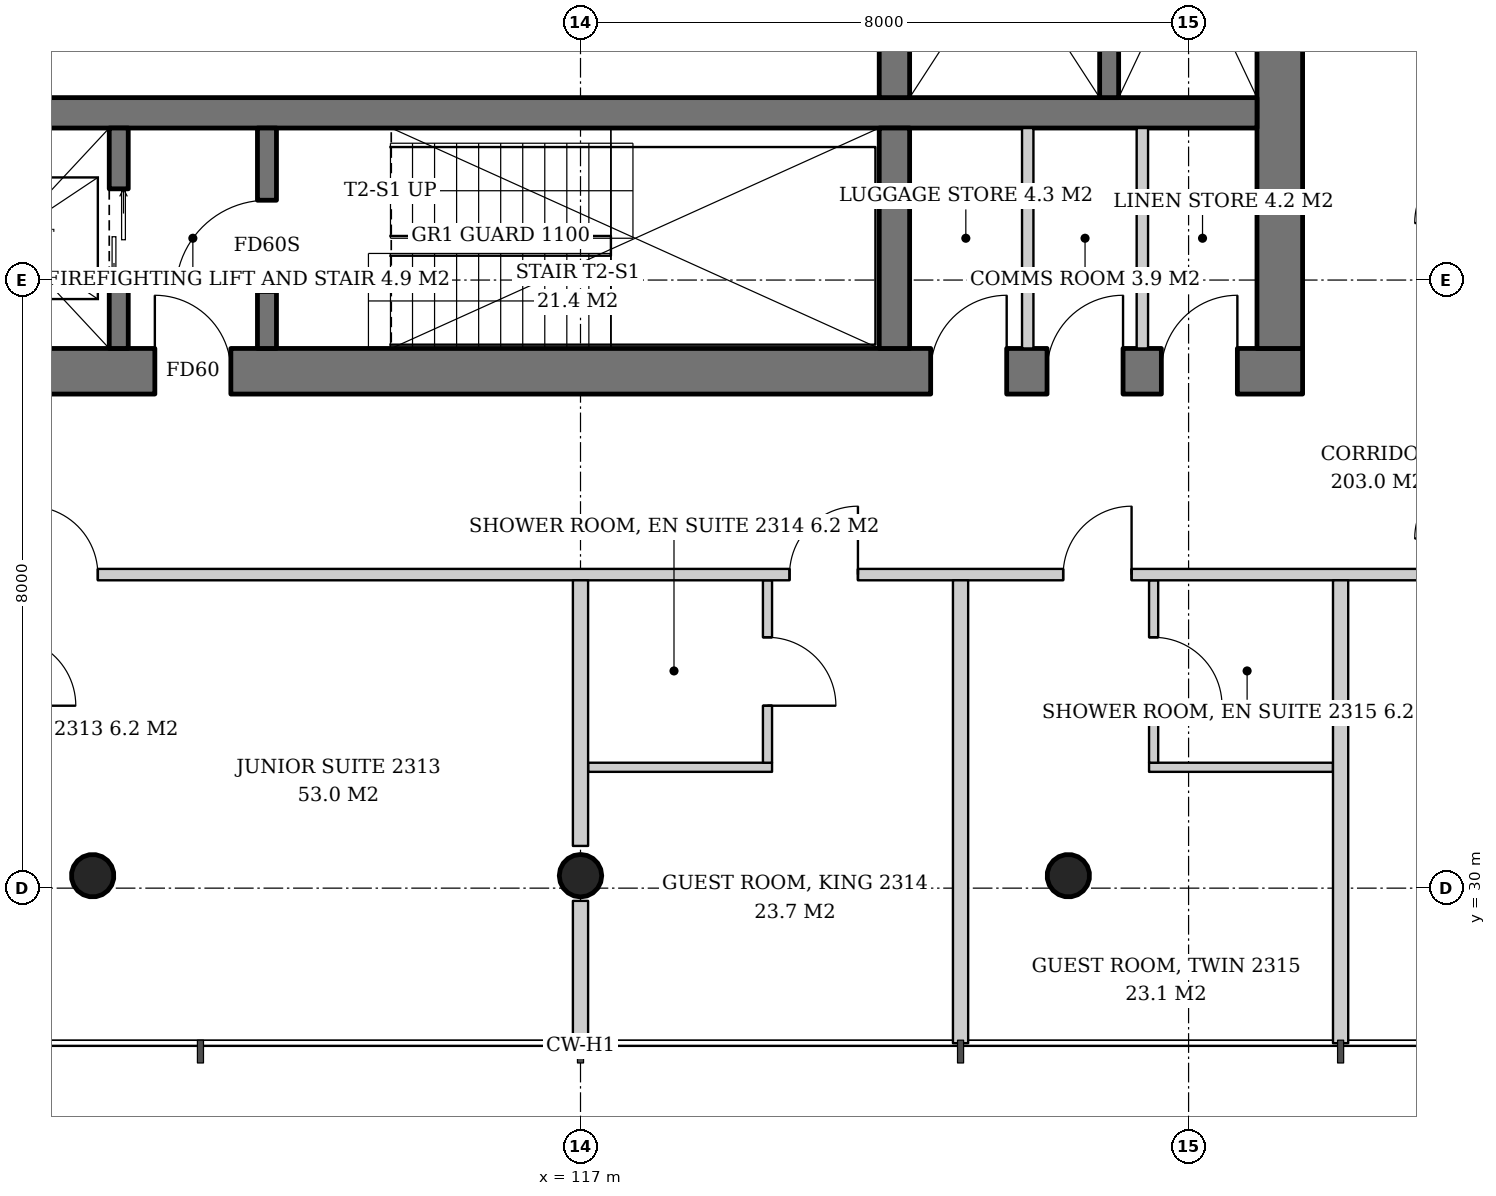
"""IFC4 building model, lengths in metres.
Left out: names, types, materials, properties, quantities, classifications, styles, units other than length and angle.
Written with IfcOpenShell. Run it as: python <this file> out.ifc"""

import sys

from ifc_helpers import new_model, si_unit, direction, frame, frame_2d, origin, origin_2d, place, context, subcontext, project, spatial, rectangle, hollow_circle, extrude, element, fill, save


model = new_model("IFC4")
c1 = context("Model", 3, precision=1e-05, world=origin(), true_north=direction((0.0, 1.0)))
c2 = subcontext(c1, "Body", "Model", "MODEL_VIEW")
j1 = project(units=[si_unit("LENGTHUNIT", "METRE"), si_unit("PLANEANGLEUNIT", "RADIAN")], contexts=[c1])
p1 = place(None, origin())
s1 = spatial("IfcSite", under=j1, at=p1, CompositionType="ELEMENT")
p2 = place(p1, origin())
s2 = spatial("IfcBuilding", under=s1, at=p2, CompositionType="ELEMENT")
p3 = place(p2, frame((0.0, 0.0, 93.2)))
s3 = spatial("IfcBuildingStorey", under=s2, at=p3, CompositionType="ELEMENT", Elevation=93.2)
p4 = place(p3, frame((110.556, 30.112, 0.0), z_axis=(0.021497706284, 0.043059584825, 0.998841188968), x_axis=(-0.894693706707, 0.446680166538, 0.0)))
e1 = element("IfcColumn", 1, at=p4, inside=s3, PredefinedType="COLUMN", context=c2, shape_type="SweptSolid", body=[
    extrude(hollow_circle(Radius=0.28, WallThickness=0.02, at=origin_2d()), origin(), (0.0, 0.0, 1.0), 3.804),
])
p5 = place(p3, frame((117.0, 30.112, 0.0), z_axis=(0.0, 0.043069538298, 0.999072076915), x_axis=(-1.0, 0.0, 0.0)))
e2 = element("IfcColumn", 2, at=p5, inside=s3, PredefinedType="COLUMN", context=c2, shape_type="SweptSolid", body=[
    extrude(hollow_circle(Radius=0.28, WallThickness=0.02, at=origin_2d()), origin(), (0.0, 0.0, 1.0), 3.803),
])
p6 = place(p3, frame((123.444, 30.112, 0.0), z_axis=(-0.021497706284, 0.043059584825, 0.998841188968), x_axis=(-0.894693706707, -0.446680166538, 0.0)))
e3 = element("IfcColumn", 3, at=p6, inside=s3, PredefinedType="COLUMN", context=c2, shape_type="SweptSolid", body=[
    extrude(hollow_circle(Radius=0.28, WallThickness=0.02, at=origin_2d()), origin(), (0.0, 0.0, 1.0), 3.804),
])
p7 = place(p3, frame((107.5, 36.8, 0.0), z_axis=(0.0, 0.0, 1.0), x_axis=(1.0, 0.0, 0.0)))
e4 = element("IfcWall", 4, at=p7, inside=s3, PredefinedType="SHEAR", context=c2, shape_type="SweptSolid", body=[
    extrude(rectangle(XDim=19.0, YDim=0.6, at=frame_2d((9.5, 0.0))), origin(), (0.0, 0.0, 1.0), 3.8),
])
p8 = place(p7, frame((3.9, 0.0, 0.0)))
e5 = element("IfcOpeningElement", 5, at=p8, cuts=e4, PredefinedType="OPENING", context=c2, shape_type="SweptSolid", body=[
    extrude(rectangle(XDim=1.0, YDim=2.1, at=frame_2d((0.5, 1.05))), frame((0.0, 0.31, 0.0), z_axis=(0.0, -1.0, 0.0), x_axis=(1.0, 0.0, 0.0)), (0.0, 0.0, 1.0), 0.62),
])
p9 = place(p7, frame((14.107, 0.0, 0.0)))
e6 = element("IfcOpeningElement", 6, at=p9, cuts=e4, PredefinedType="OPENING", context=c2, shape_type="SweptSolid", body=[
    extrude(rectangle(XDim=1.0, YDim=2.1, at=frame_2d((0.5, 1.05))), frame((0.0, 0.31, 0.0), z_axis=(0.0, -1.0, 0.0), x_axis=(1.0, 0.0, 0.0)), (0.0, 0.0, 1.0), 0.62),
])
p10 = place(p7, frame((15.638, 0.0, 0.0)))
e7 = element("IfcOpeningElement", 7, at=p10, cuts=e4, PredefinedType="OPENING", context=c2, shape_type="SweptSolid", body=[
    extrude(rectangle(XDim=1.0, YDim=2.1, at=frame_2d((0.5, 1.05))), frame((0.0, 0.31, 0.0), z_axis=(0.0, -1.0, 0.0), x_axis=(1.0, 0.0, 0.0)), (0.0, 0.0, 1.0), 0.62),
])
p11 = place(p7, frame((17.142, 0.0, 0.0)))
e8 = element("IfcOpeningElement", 8, at=p11, cuts=e4, PredefinedType="OPENING", context=c2, shape_type="SweptSolid", body=[
    extrude(rectangle(XDim=1.0, YDim=2.1, at=frame_2d((0.5, 1.05))), frame((0.0, 0.31, 0.0), z_axis=(0.0, -1.0, 0.0), x_axis=(1.0, 0.0, 0.0)), (0.0, 0.0, 1.0), 0.62),
])
p12 = place(p3, frame((126.2, 37.1, 0.0), z_axis=(0.0, 0.0, 1.0), x_axis=(0.0, 1.0, 0.0)))
e9 = element("IfcWall", 9, at=p12, inside=s3, PredefinedType="SHEAR", context=c2, shape_type="SweptSolid", body=[
    extrude(rectangle(XDim=17.8, YDim=0.6, at=frame_2d((8.9, 0.0))), origin(), (0.0, 0.0, 1.0), 3.8),
])
p13 = place(p12, frame((8.0, 0.0, 0.0)))
e10 = element("IfcOpeningElement", 10, at=p13, cuts=e9, PredefinedType="OPENING", context=c2, shape_type="SweptSolid", body=[
    extrude(rectangle(XDim=1.8, YDim=2.4, at=frame_2d((0.9, 1.2))), frame((0.0, 0.31, 0.0), z_axis=(0.0, -1.0, 0.0), x_axis=(1.0, 0.0, 0.0)), (0.0, 0.0, 1.0), 0.62),
])
p14 = place(p3, frame((108.1, 40.2, 0.0), z_axis=(0.0, 0.0, 1.0), x_axis=(1.0, 0.0, 0.0)))
e11 = element("IfcWall", 11, at=p14, inside=s3, PredefinedType="SHEAR", context=c2, shape_type="SweptSolid", body=[
    extrude(rectangle(XDim=17.8, YDim=0.4, at=frame_2d((8.9, 0.0))), origin(), (0.0, 0.0, 1.0), 3.8),
])
p15 = place(p3, frame((121.13, 37.1, 0.0), z_axis=(0.0, 0.0, 1.0), x_axis=(0.0, 1.0, 0.0)))
e12 = element("IfcWall", 12, at=p15, inside=s3, PredefinedType="SHEAR", context=c2, shape_type="SweptSolid", body=[
    extrude(rectangle(XDim=2.9, YDim=0.4, at=frame_2d((1.45, 0.0))), origin(), (0.0, 0.0, 1.0), 3.8),
])
p16 = place(p3, frame((121.13, 40.4, 0.0), z_axis=(0.0, 0.0, 1.0), x_axis=(0.0, 1.0, 0.0)))
e13 = element("IfcWall", 13, at=p16, inside=s3, PredefinedType="SHEAR", context=c2, shape_type="SweptSolid", body=[
    extrude(rectangle(XDim=11.2, YDim=0.4, at=frame_2d((5.6, 0.0))), origin(), (0.0, 0.0, 1.0), 3.8),
])
p17 = place(p3, frame((110.925, 37.1, 0.0), z_axis=(0.0, 0.0, 1.0), x_axis=(0.0, 1.0, 0.0)))
e14 = element("IfcWall", 14, at=p17, inside=s3, PredefinedType="SHEAR", context=c2, shape_type="SweptSolid", body=[
    extrude(rectangle(XDim=2.9, YDim=0.25, at=frame_2d((1.45, 0.0))), origin(), (0.0, 0.0, 1.0), 3.8),
])
p18 = place(p17, frame((0.8, 0.0, 0.0)))
e15 = element("IfcOpeningElement", 15, at=p18, cuts=e14, PredefinedType="OPENING", context=c2, shape_type="SweptSolid", body=[
    extrude(rectangle(XDim=1.3, YDim=2.2, at=frame_2d((0.65, 1.1))), frame((0.0, 0.135, 0.0), z_axis=(0.0, -1.0, 0.0), x_axis=(1.0, 0.0, 0.0)), (0.0, 0.0, 1.0), 0.27),
])
p19 = place(p3, frame((112.875, 37.1, 0.0), z_axis=(0.0, 0.0, 1.0), x_axis=(0.0, 1.0, 0.0)))
e16 = element("IfcWall", 16, at=p19, inside=s3, PredefinedType="SHEAR", context=c2, shape_type="SweptSolid", body=[
    extrude(rectangle(XDim=2.9, YDim=0.25, at=frame_2d((1.45, 0.0))), origin(), (0.0, 0.0, 1.0), 3.8),
])
p20 = place(p19, frame((0.75, 0.0, 0.0)))
e17 = element("IfcOpeningElement", 17, at=p20, cuts=e16, PredefinedType="OPENING", context=c2, shape_type="SweptSolid", body=[
    extrude(rectangle(XDim=1.2, YDim=2.1, at=frame_2d((0.6, 1.05))), frame((0.0, 0.135, 0.0), z_axis=(0.0, -1.0, 0.0), x_axis=(1.0, 0.0, 0.0)), (0.0, 0.0, 1.0), 0.27),
])
p21 = place(p3, frame((123.955, 44.25, 0.0), z_axis=(0.0, 0.0, 1.0), x_axis=(0.0, -1.0, 0.0)))
e18 = element("IfcWall", 18, at=p21, inside=s3, PredefinedType="SHEAR", context=c2, shape_type="SweptSolid", body=[
    extrude(rectangle(XDim=3.85, YDim=0.25, at=frame_2d((1.925, 0.0))), origin(), (0.0, 0.0, 1.0), 3.8),
])
for number, where, z_axis, x_axis in (
    (19, (122.884, 37.1, 0.0), (0.0, 0.0, 1.0), (0.0, 1.0, 0.0)),
    (20, (124.392, 37.1, 0.0), (0.0, 0.0, 1.0), (0.0, 1.0, 0.0)),
):
    element("IfcWall", number, at=place(p3, frame(where, z_axis=z_axis, x_axis=x_axis)), inside=s3, PredefinedType="SOLIDWALL", context=c2, shape_type="SweptSolid", body=[
        extrude(rectangle(XDim=2.9, YDim=0.15, at=frame_2d((1.45, 0.0))), origin(), (0.0, 0.0, 1.0), 3.6),
    ])
p22 = place(p3, frame((117.1, 31.59, 0.0), z_axis=(0.0, 0.0, 1.0), x_axis=(1.0, 0.0, 0.0)))
e21 = element("IfcWall", 21, at=p22, inside=s3, PredefinedType="PARTITIONING", context=c2, shape_type="SweptSolid", body=[
    extrude(rectangle(XDim=2.42, YDim=0.12, at=frame_2d((1.21, 0.0))), origin(), (0.0, 0.0, 1.0), 3.6),
])
p23 = place(p3, frame((119.46, 34.05, 0.0), z_axis=(0.0, 0.0, 1.0), x_axis=(0.0, -1.0, 0.0)))
e22 = element("IfcWall", 22, at=p23, inside=s3, PredefinedType="PARTITIONING", context=c2, shape_type="SweptSolid", body=[
    extrude(rectangle(XDim=2.4, YDim=0.12, at=frame_2d((1.2, 0.0))), origin(), (0.0, 0.0, 1.0), 3.6),
])
p24 = place(p23, frame((0.75, 0.0, 0.0)))
e23 = element("IfcOpeningElement", 23, at=p24, cuts=e22, PredefinedType="OPENING", context=c2, shape_type="SweptSolid", body=[
    extrude(rectangle(XDim=0.9, YDim=2.1, at=frame_2d((0.45, 1.05))), frame((0.0, 0.07, 0.0), z_axis=(0.0, -1.0, 0.0), x_axis=(1.0, 0.0, 0.0)), (0.0, 0.0, 1.0), 0.14),
])
p25 = place(p3, frame((124.48, 31.59, 0.0), z_axis=(0.0, 0.0, 1.0), x_axis=(1.0, 0.0, 0.0)))
e24 = element("IfcWall", 24, at=p25, inside=s3, PredefinedType="PARTITIONING", context=c2, shape_type="SweptSolid", body=[
    extrude(rectangle(XDim=2.42, YDim=0.12, at=frame_2d((1.21, 0.0))), origin(), (0.0, 0.0, 1.0), 3.0),
])
p26 = place(p3, frame((124.54, 34.05, 0.0), z_axis=(0.0, 0.0, 1.0), x_axis=(0.0, -1.0, 0.0)))
e25 = element("IfcWall", 25, at=p26, inside=s3, PredefinedType="PARTITIONING", context=c2, shape_type="SweptSolid", body=[
    extrude(rectangle(XDim=2.4, YDim=0.12, at=frame_2d((1.2, 0.0))), origin(), (0.0, 0.0, 1.0), 3.0),
])
p27 = place(p26, frame((0.75, 0.0, 0.0)))
e26 = element("IfcOpeningElement", 26, at=p27, cuts=e25, PredefinedType="OPENING", context=c2, shape_type="SweptSolid", body=[
    extrude(rectangle(XDim=0.9, YDim=2.1, at=frame_2d((0.45, 1.05))), frame((0.0, 0.07, 0.0), z_axis=(0.0, -1.0, 0.0), x_axis=(1.0, 0.0, 0.0)), (0.0, 0.0, 1.0), 0.14),
])
p28 = place(p3, frame((105.209, 34.125, 0.0), z_axis=(0.0, 0.0, 1.0), x_axis=(1.0, 0.0, 0.0)))
e27 = element("IfcWall", 27, at=p28, inside=s3, PredefinedType="PARTITIONING", context=c2, shape_type="SweptSolid", body=[
    extrude(rectangle(XDim=23.583, YDim=0.15, at=frame_2d((11.791, 0.0))), origin(), (0.0, 0.0, 1.0), 2.9),
])
p29 = place(p28, frame((0.391, 0.0, 0.0)))
e28 = element("IfcOpeningElement", 28, at=p29, cuts=e27, PredefinedType="OPENING", context=c2, shape_type="SweptSolid", body=[
    extrude(rectangle(XDim=0.9, YDim=2.1, at=frame_2d((0.45, 1.05))), frame((0.0, 0.085, 0.0), z_axis=(0.0, -1.0, 0.0), x_axis=(1.0, 0.0, 0.0)), (0.0, 0.0, 1.0), 0.17),
])
p30 = place(p28, frame((4.541, 0.0, 0.0)))
e29 = element("IfcOpeningElement", 29, at=p30, cuts=e27, PredefinedType="OPENING", context=c2, shape_type="SweptSolid", body=[
    extrude(rectangle(XDim=0.9, YDim=2.1, at=frame_2d((0.45, 1.05))), frame((0.0, 0.085, 0.0), z_axis=(0.0, -1.0, 0.0), x_axis=(1.0, 0.0, 0.0)), (0.0, 0.0, 1.0), 0.17),
])
p31 = place(p28, frame((14.541, 0.0, 0.0)))
e30 = element("IfcOpeningElement", 30, at=p31, cuts=e27, PredefinedType="OPENING", context=c2, shape_type="SweptSolid", body=[
    extrude(rectangle(XDim=0.9, YDim=2.1, at=frame_2d((0.45, 1.05))), frame((0.0, 0.085, 0.0), z_axis=(0.0, -1.0, 0.0), x_axis=(1.0, 0.0, 0.0)), (0.0, 0.0, 1.0), 0.17),
])
p32 = place(p28, frame((18.141, 0.0, 0.0)))
e31 = element("IfcOpeningElement", 31, at=p32, cuts=e27, PredefinedType="OPENING", context=c2, shape_type="SweptSolid", body=[
    extrude(rectangle(XDim=0.9, YDim=2.1, at=frame_2d((0.45, 1.05))), frame((0.0, 0.085, 0.0), z_axis=(0.0, -1.0, 0.0), x_axis=(1.0, 0.0, 0.0)), (0.0, 0.0, 1.0), 0.17),
])
p33 = place(p3, frame((117.0, 34.05, 0.0), z_axis=(0.0, 0.0, 1.0), x_axis=(0.0, -1.0, 0.0)))
e32 = element("IfcWall", 32, at=p33, inside=s3, PredefinedType="PARTITIONING", context=c2, shape_type="SweptSolid", body=[
    extrude(rectangle(XDim=3.495, YDim=0.2, at=frame_2d((1.747, 0.0))), origin(), (0.0, 0.0, 1.0), 3.6),
])
p34 = place(p3, frame((117.0, 29.833, 0.0), z_axis=(0.0, 0.0, 1.0), x_axis=(0.0, -1.0, 0.0)))
e33 = element("IfcWall", 33, at=p34, inside=s3, PredefinedType="PARTITIONING", context=c2, shape_type="SweptSolid", body=[
    extrude(rectangle(XDim=1.873, YDim=0.2, at=frame_2d((0.936, 0.0))), origin(), (0.0, 0.0, 1.0), 3.6),
])
for number, where, z_axis, x_axis in (
    (34, (122.0, 34.05, 0.0), (0.0, 0.0, 1.0), (0.0, -1.0, 0.0)),
    (35, (127.0, 34.05, 0.0), (0.0, 0.0, 1.0), (0.0, -1.0, 0.0)),
):
    element("IfcWall", number, at=place(p3, frame(where, z_axis=z_axis, x_axis=x_axis)), inside=s3, PredefinedType="PARTITIONING", context=c2, shape_type="SweptSolid", body=[
        extrude(rectangle(XDim=6.09, YDim=0.2, at=frame_2d((3.045, 0.0))), origin(), (0.0, 0.0, 1.0), 3.2),
    ])
p35 = place(p18, origin())
e36 = element("IfcDoor", 36, at=p35, inside=s3, OperationType="DOUBLE_DOOR_SLIDING", PredefinedType="DOOR", context=c2, shape_type="SweptSolid", body=[
    extrude(rectangle(XDim=1.3, YDim=2.2, at=frame_2d((0.65, 1.1))), frame((0.0, 0.025, 0.0), z_axis=(0.0, -1.0, 0.0), x_axis=(1.0, 0.0, 0.0)), (0.0, 0.0, 1.0), 0.05),
])
fill(e15, e36)
p36 = place(p20, origin())
e37 = element("IfcDoor", 37, at=p36, inside=s3, OperationType="SINGLE_SWING_LEFT", PredefinedType="DOOR", context=c2, shape_type="SweptSolid", body=[
    extrude(rectangle(XDim=1.2, YDim=2.1, at=frame_2d((0.6, 1.05))), frame((0.0, 0.025, 0.0), z_axis=(0.0, -1.0, 0.0), x_axis=(1.0, 0.0, 0.0)), (0.0, 0.0, 1.0), 0.05),
])
fill(e17, e37)
p37 = place(p8, origin())
e38 = element("IfcDoor", 38, at=p37, inside=s3, OperationType="SINGLE_SWING_LEFT", PredefinedType="DOOR", context=c2, shape_type="SweptSolid", body=[
    extrude(rectangle(XDim=1.0, YDim=2.1, at=frame_2d((0.5, 1.05))), frame((0.0, 0.025, 0.0), z_axis=(0.0, -1.0, 0.0), x_axis=(1.0, 0.0, 0.0)), (0.0, 0.0, 1.0), 0.05),
])
fill(e5, e38)
p38 = place(p9, origin())
e39 = element("IfcDoor", 39, at=p38, inside=s3, OperationType="SINGLE_SWING_RIGHT", PredefinedType="DOOR", context=c2, shape_type="SweptSolid", body=[
    extrude(rectangle(XDim=1.0, YDim=2.1, at=frame_2d((0.5, 1.05))), frame((0.0, 0.29, 0.0), z_axis=(0.0, -1.0, 0.0), x_axis=(1.0, 0.0, 0.0)), (0.0, 0.0, 1.0), 0.05),
])
fill(e6, e39)
p39 = place(p10, origin())
e40 = element("IfcDoor", 40, at=p39, inside=s3, OperationType="SINGLE_SWING_RIGHT", PredefinedType="DOOR", context=c2, shape_type="SweptSolid", body=[
    extrude(rectangle(XDim=1.0, YDim=2.1, at=frame_2d((0.5, 1.05))), frame((0.0, 0.29, 0.0), z_axis=(0.0, -1.0, 0.0), x_axis=(1.0, 0.0, 0.0)), (0.0, 0.0, 1.0), 0.05),
])
fill(e7, e40)
p40 = place(p11, origin())
e41 = element("IfcDoor", 41, at=p40, inside=s3, OperationType="SINGLE_SWING_RIGHT", PredefinedType="DOOR", context=c2, shape_type="SweptSolid", body=[
    extrude(rectangle(XDim=1.0, YDim=2.1, at=frame_2d((0.5, 1.05))), frame((0.0, 0.29, 0.0), z_axis=(0.0, -1.0, 0.0), x_axis=(1.0, 0.0, 0.0)), (0.0, 0.0, 1.0), 0.05),
])
fill(e8, e41)
p41 = place(p24, origin())
e42 = element("IfcDoor", 42, at=p41, inside=s3, OperationType="SINGLE_SWING_RIGHT", PredefinedType="DOOR", context=c2, shape_type="SweptSolid", body=[
    extrude(rectangle(XDim=0.9, YDim=2.1, at=frame_2d((0.45, 1.05))), frame((0.0, 0.025, 0.0), z_axis=(0.0, -1.0, 0.0), x_axis=(1.0, 0.0, 0.0)), (0.0, 0.0, 1.0), 0.05),
])
fill(e23, e42)
p42 = place(p27, origin())
e43 = element("IfcDoor", 43, at=p42, inside=s3, OperationType="SINGLE_SWING_RIGHT", PredefinedType="DOOR", context=c2, shape_type="SweptSolid", body=[
    extrude(rectangle(XDim=0.9, YDim=2.1, at=frame_2d((0.45, 1.05))), frame((0.0, 0.025, 0.0), z_axis=(0.0, -1.0, 0.0), x_axis=(1.0, 0.0, 0.0)), (0.0, 0.0, 1.0), 0.05),
])
fill(e26, e43)
p43 = place(p30, origin())
e44 = element("IfcDoor", 44, at=p43, inside=s3, OperationType="SINGLE_SWING_LEFT", PredefinedType="DOOR", context=c2, shape_type="SweptSolid", body=[
    extrude(rectangle(XDim=0.9, YDim=2.1, at=frame_2d((0.45, 1.05))), frame((0.0, 0.025, 0.0), z_axis=(0.0, -1.0, 0.0), x_axis=(1.0, 0.0, 0.0)), (0.0, 0.0, 1.0), 0.05),
])
fill(e29, e44)
p44 = place(p31, origin())
e45 = element("IfcDoor", 45, at=p44, inside=s3, OperationType="SINGLE_SWING_RIGHT", PredefinedType="DOOR", context=c2, shape_type="SweptSolid", body=[
    extrude(rectangle(XDim=0.9, YDim=2.1, at=frame_2d((0.45, 1.05))), frame((0.0, 0.025, 0.0), z_axis=(0.0, -1.0, 0.0), x_axis=(1.0, 0.0, 0.0)), (0.0, 0.0, 1.0), 0.05),
])
fill(e30, e45)
p45 = place(p32, origin())
e46 = element("IfcDoor", 46, at=p45, inside=s3, OperationType="SINGLE_SWING_RIGHT", PredefinedType="DOOR", context=c2, shape_type="SweptSolid", body=[
    extrude(rectangle(XDim=0.9, YDim=2.1, at=frame_2d((0.45, 1.05))), frame((0.0, 0.025, 0.0), z_axis=(0.0, -1.0, 0.0), x_axis=(1.0, 0.0, 0.0)), (0.0, 0.0, 1.0), 0.05),
])
fill(e31, e46)
save(model, sys.argv[1])
